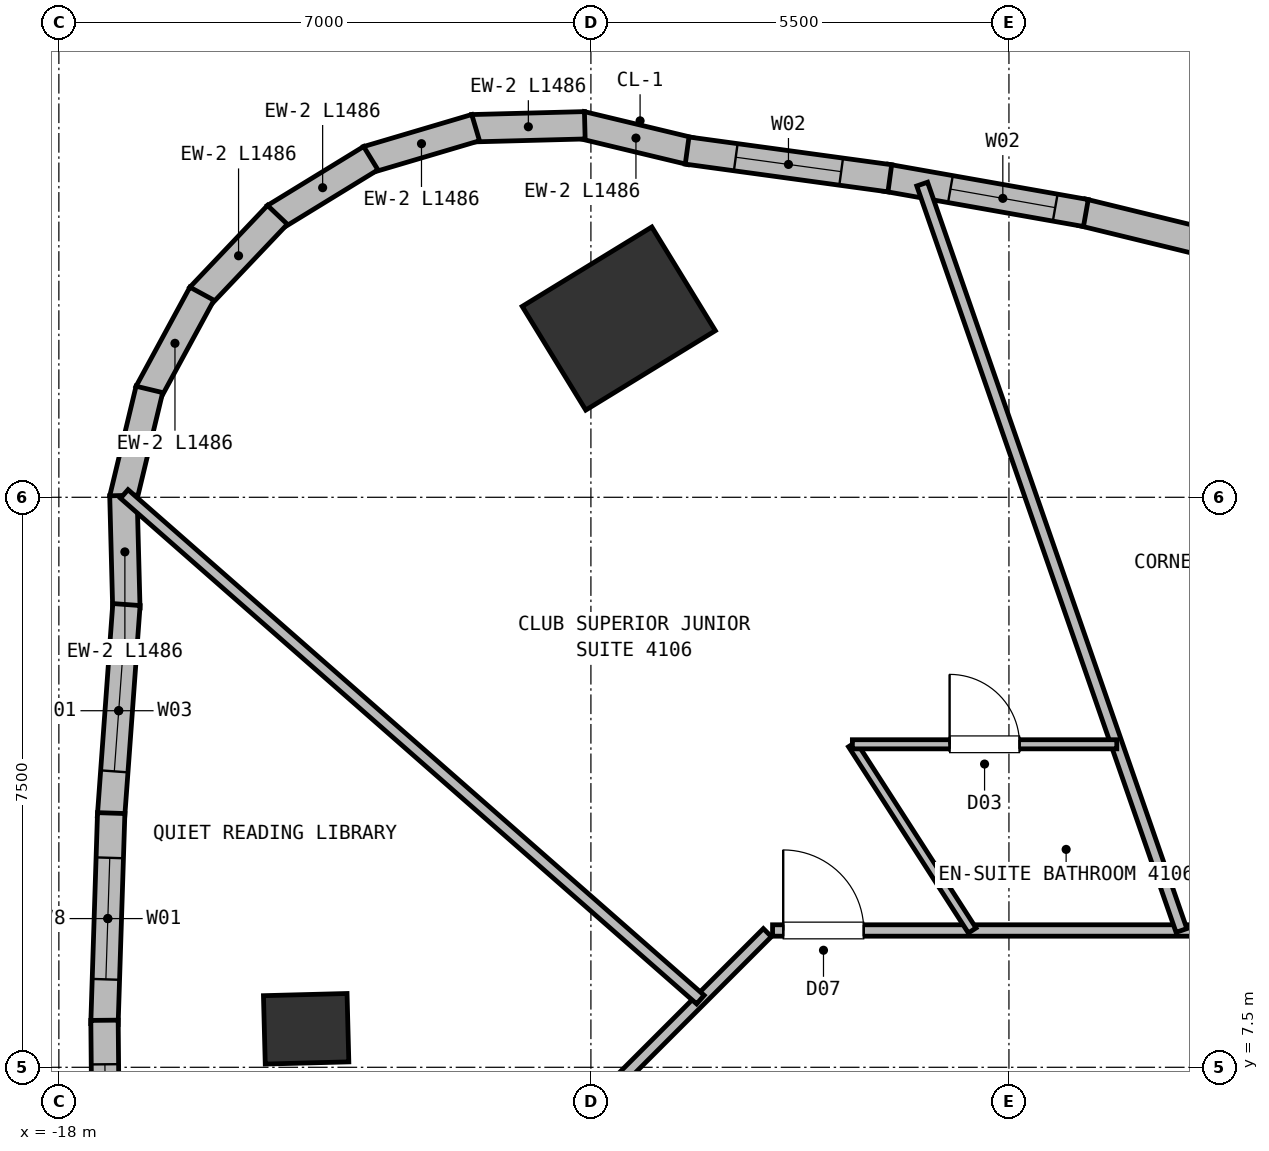
"""IFC4 building model, lengths in metres.
Left out: names, types, materials, properties, quantities, classifications, styles, units other than length and angle.
Written with IfcOpenShell. Run it as: python <this file> out.ifc"""

import sys

from ifc_helpers import new_model, si_unit, direction, frame, frame_2d, origin, origin_2d, place, context, subcontext, project, spatial, rectangle, extrude, element, fill, save


model = new_model("IFC4")
c1 = context("Model", 3, precision=1e-05, world=origin(), true_north=direction((0.0, 1.0)))
c2 = subcontext(c1, "Body", "Model", "MODEL_VIEW")
j1 = project(units=[si_unit("LENGTHUNIT", "METRE"), si_unit("PLANEANGLEUNIT", "RADIAN")], contexts=[c1])
p1 = place(None, origin())
s1 = spatial("IfcSite", under=j1, at=p1, CompositionType="ELEMENT")
p2 = place(p1, origin())
s2 = spatial("IfcBuilding", under=s1, at=p2, CompositionType="ELEMENT")
p3 = place(p2, frame((0.0, 0.0, 153.5)))
s3 = spatial("IfcBuildingStorey", under=s2, at=p3, CompositionType="ELEMENT", Elevation=153.5)
p4 = place(p3, frame((-10.633, 17.352, 0.0), z_axis=(0.0, 0.0, 1.0), x_axis=(-0.522498564716, 0.852640164354, 0.0)))
e1 = element("IfcColumn", 1, at=p4, inside=s3, PredefinedType="COLUMN", context=c2, shape_type="SweptSolid", body=[
    extrude(rectangle(XDim=1.6, YDim=2.0, at=origin_2d()), origin(), (0.0, 0.0, 1.0), 3.75),
])
p5 = place(p3, frame((-14.747, 8.007, 0.0), z_axis=(0.0, 0.0, 1.0), x_axis=(-0.026176948308, 0.999657324976, 0.0)))
e2 = element("IfcColumn", 2, at=p5, inside=s3, PredefinedType="COLUMN", context=c2, shape_type="SweptSolid", body=[
    extrude(rectangle(XDim=0.9, YDim=1.1, at=origin_2d()), origin(), (0.0, 0.0, 1.0), 3.75),
])
for number, where, z_axis, x_axis in (
    (3, (-11.13, 19.9, 0.0), (0.0, 0.0, 1.0), (0.972, -0.233, 0.0)),
    (4, (-12.566, 19.856, 0.0), (0.0, 0.0, 1.0), (1.0, 0.026, 0.0)),
    (5, (-13.941, 19.441, 0.0), (0.0, 0.0, 1.0), (0.959, 0.284, 0.0)),
):
    element("IfcWall", number, at=place(p3, frame(where, z_axis=z_axis, x_axis=x_axis)), inside=s3, PredefinedType="SOLIDWALL", context=c2, shape_type="SweptSolid", body=[
        extrude(rectangle(XDim=1.486, YDim=0.36, at=frame_2d((0.743, 0.0))), origin(), (0.0, 0.0, 1.0), 3.5),
    ])
p6 = place(p3, frame((-15.163, 18.685, 0.0), z_axis=(0.0, 0.0, 1.0), x_axis=(0.852672081239, 0.522446477522, 0.0)))
e6 = element("IfcWall", 6, at=p6, inside=s3, PredefinedType="SOLIDWALL", context=c2, shape_type="SweptSolid", body=[
    extrude(rectangle(XDim=1.486, YDim=0.36, at=frame_2d((0.743, 0.0))), origin(), (0.0, 0.0, 1.0), 3.5),
])
p7 = place(p3, frame((-16.147, 17.639, 0.0), z_axis=(0.0, 0.0, 1.0), x_axis=(0.688377955726, 0.725352183474, 0.0)))
e7 = element("IfcWall", 7, at=p7, inside=s3, PredefinedType="SOLIDWALL", context=c2, shape_type="SweptSolid", body=[
    extrude(rectangle(XDim=1.486, YDim=0.36, at=frame_2d((0.743, 0.0))), origin(), (0.0, 0.0, 1.0), 3.5),
])
for number, where, z_axis, x_axis in (
    (8, (-16.827, 16.373, 0.0), (0.0, 0.0, 1.0), (0.477, 0.879, 0.0)),
    (9, (-17.156, 14.975, 0.0), (0.0, 0.0, 1.0), (0.233, 0.972, 0.0)),
):
    element("IfcWall", number, at=place(p3, frame(where, z_axis=z_axis, x_axis=x_axis)), inside=s3, PredefinedType="SOLIDWALL", context=c2, shape_type="SweptSolid", body=[
        extrude(rectangle(XDim=1.486, YDim=0.36, at=frame_2d((0.743, 0.0))), origin(), (0.0, 0.0, 1.0), 3.5),
    ])
p8 = place(p3, frame((-17.112, 13.539, 0.0), z_axis=(0.0, 0.0, 1.0), x_axis=(-0.026129494011, 0.999658566483, 0.0)))
e10 = element("IfcWall", 10, at=p8, inside=s3, PredefinedType="SOLIDWALL", context=c2, shape_type="SweptSolid", body=[
    extrude(rectangle(XDim=1.486, YDim=0.36, at=frame_2d((0.743, 0.0))), origin(), (0.0, 0.0, 1.0), 3.5),
])
p9 = place(p3, frame((-17.314, 10.795, 0.0), z_axis=(0.0, 0.0, 1.0), x_axis=(0.072603479606, 0.99736088491, 0.0)))
e11 = element("IfcWall", 11, at=p9, inside=s3, PredefinedType="SOLIDWALL", context=c2, shape_type="SweptSolid", body=[
    extrude(rectangle(XDim=2.801, YDim=0.36, at=frame_2d((1.4, 0.0))), origin(), (0.0, 0.0, 1.0), 3.5),
])
p10 = place(p9, frame((0.601, 0.0, 0.72)))
e12 = element("IfcOpeningElement", 12, at=p10, cuts=e11, PredefinedType="OPENING", context=c2, shape_type="SweptSolid", body=[
    extrude(rectangle(XDim=1.6, YDim=1.88, at=frame_2d((0.8, 0.94))), frame((0.0, 0.19, 0.0), z_axis=(0.0, -1.0, 0.0), x_axis=(1.0, 0.0, 0.0)), (0.0, 0.0, 1.0), 0.38),
])
p11 = place(p3, frame((-17.4, 8.069, 0.0), z_axis=(0.0, 0.0, 1.0), x_axis=(0.031907059623, 0.999490840151, 0.0)))
e13 = element("IfcWall", 13, at=p11, inside=s3, PredefinedType="SOLIDWALL", context=c2, shape_type="SweptSolid", body=[
    extrude(rectangle(XDim=2.778, YDim=0.36, at=frame_2d((1.389, 0.0))), origin(), (0.0, 0.0, 1.0), 3.5),
])
p12 = place(p11, frame((0.589, 0.0, 0.72)))
e14 = element("IfcOpeningElement", 14, at=p12, cuts=e13, PredefinedType="OPENING", context=c2, shape_type="SweptSolid", body=[
    extrude(rectangle(XDim=1.6, YDim=1.88, at=frame_2d((0.8, 0.94))), frame((0.0, 0.19, 0.0), z_axis=(0.0, -1.0, 0.0), x_axis=(1.0, 0.0, 0.0)), (0.0, 0.0, 1.0), 0.38),
])
p13 = place(p3, frame((-17.374, 5.36, 0.0), z_axis=(0.0, 0.0, 1.0), x_axis=(-0.009381778629, 0.999955990146, 0.0)))
e15 = element("IfcWall", 15, at=p13, inside=s3, PredefinedType="SOLIDWALL", context=c2, shape_type="SweptSolid", body=[
    extrude(rectangle(XDim=2.758, YDim=0.36, at=frame_2d((1.379, 0.0))), origin(), (0.0, 0.0, 1.0), 3.5),
])
p14 = place(p13, frame((0.579, 0.0, 0.72)))
e16 = element("IfcOpeningElement", 16, at=p14, cuts=e15, PredefinedType="OPENING", context=c2, shape_type="SweptSolid", body=[
    extrude(rectangle(XDim=1.6, YDim=1.88, at=frame_2d((0.8, 0.94))), frame((0.0, 0.19, 0.0), z_axis=(0.0, -1.0, 0.0), x_axis=(1.0, 0.0, 0.0)), (0.0, 0.0, 1.0), 0.38),
])
p15 = place(p3, frame((-4.537, 18.75, 0.0), z_axis=(0.0, 0.0, 1.0), x_axis=(0.971526219703, -0.236932067122, 0.0)))
e17 = element("IfcWall", 17, at=p15, inside=s3, PredefinedType="SOLIDWALL", context=c2, shape_type="SweptSolid", body=[
    extrude(rectangle(XDim=5.827, YDim=0.36, at=frame_2d((2.914, 0.0))), origin(), (0.0, 0.0, 1.0), 3.5),
])
p16 = place(p15, frame((1.66, 0.0, 0.72)))
e18 = element("IfcOpeningElement", 18, at=p16, cuts=e17, PredefinedType="OPENING", context=c2, shape_type="SweptSolid", body=[
    extrude(rectangle(XDim=1.6, YDim=1.88, at=frame_2d((0.8, 0.94))), frame((0.0, 0.19, 0.0), z_axis=(0.0, -1.0, 0.0), x_axis=(1.0, 0.0, 0.0)), (0.0, 0.0, 1.0), 0.38),
])
p17 = place(p3, frame((-7.117, 19.205, 0.0), z_axis=(0.0, 0.0, 1.0), x_axis=(0.984708898385, -0.174207879961, 0.0)))
e19 = element("IfcWall", 19, at=p17, inside=s3, PredefinedType="SOLIDWALL", context=c2, shape_type="SweptSolid", body=[
    extrude(rectangle(XDim=2.67, YDim=0.36, at=frame_2d((1.335, 0.0))), origin(), (0.0, 0.0, 1.0), 3.5),
])
p18 = place(p17, frame((0.86, 0.0, 0.72)))
e20 = element("IfcOpeningElement", 20, at=p18, cuts=e19, PredefinedType="OPENING", context=c2, shape_type="SweptSolid", body=[
    extrude(rectangle(XDim=1.4, YDim=1.84, at=frame_2d((0.7, 0.92))), frame((0.0, 0.19, 0.0), z_axis=(0.0, -1.0, 0.0), x_axis=(1.0, 0.0, 0.0)), (0.0, 0.0, 1.0), 0.38),
])
p19 = place(p3, frame((-9.734, 19.562, 0.0), z_axis=(0.0, 0.0, 1.0), x_axis=(0.990763260655, -0.135602954745, 0.0)))
e21 = element("IfcWall", 21, at=p19, inside=s3, PredefinedType="SOLIDWALL", context=c2, shape_type="SweptSolid", body=[
    extrude(rectangle(XDim=2.692, YDim=0.36, at=frame_2d((1.346, 0.0))), origin(), (0.0, 0.0, 1.0), 3.5),
])
p20 = place(p19, frame((0.646, 0.0, 0.72)))
e22 = element("IfcOpeningElement", 22, at=p20, cuts=e21, PredefinedType="OPENING", context=c2, shape_type="SweptSolid", body=[
    extrude(rectangle(XDim=1.4, YDim=1.84, at=frame_2d((0.7, 0.92))), frame((0.0, 0.19, 0.0), z_axis=(0.0, -1.0, 0.0), x_axis=(1.0, 0.0, 0.0)), (0.0, 0.0, 1.0), 0.38),
])
p21 = place(p3, frame((-8.61, 9.3, 0.0), z_axis=(0.0, 0.0, 1.0), x_axis=(1.0, 0.0, 0.0)))
e23 = element("IfcWall", 23, at=p21, inside=s3, PredefinedType="PARTITIONING", context=c2, shape_type="SweptSolid", body=[
    extrude(rectangle(XDim=17.22, YDim=0.15, at=frame_2d((8.61, 0.0))), origin(), (0.0, 0.0, 1.0), 3.5),
])
p22 = place(p21, frame((12.527, 0.0, 0.0)))
e24 = element("IfcOpeningElement", 24, at=p22, cuts=e23, PredefinedType="OPENING", context=c2, shape_type="SweptSolid", body=[
    extrude(rectangle(XDim=1.0, YDim=2.15, at=frame_2d((0.5, 1.075))), frame((0.0, 0.085, 0.0), z_axis=(0.0, -1.0, 0.0), x_axis=(1.0, 0.0, 0.0)), (0.0, 0.0, 1.0), 0.17),
])
p23 = place(p21, frame((6.231, 0.0, 0.0)))
e25 = element("IfcOpeningElement", 25, at=p23, cuts=e23, PredefinedType="OPENING", context=c2, shape_type="SweptSolid", body=[
    extrude(rectangle(XDim=1.06, YDim=2.15, at=frame_2d((0.53, 1.075))), frame((0.0, 0.085, 0.0), z_axis=(0.0, -1.0, 0.0), x_axis=(1.0, 0.0, 0.0)), (0.0, 0.0, 1.0), 0.17),
])
p24 = place(p21, frame((0.14, 0.0, 0.0)))
e26 = element("IfcOpeningElement", 26, at=p24, cuts=e23, PredefinedType="OPENING", context=c2, shape_type="SweptSolid", body=[
    extrude(rectangle(XDim=1.06, YDim=2.15, at=frame_2d((0.53, 1.075))), frame((0.0, 0.085, 0.0), z_axis=(0.0, -1.0, 0.0), x_axis=(1.0, 0.0, 0.0)), (0.0, 0.0, 1.0), 0.17),
])
p25 = place(p3, frame((-10.722, 7.228, 0.0), z_axis=(0.0, 0.0, 1.0), x_axis=(0.707106781187, 0.707106781187, 0.0)))
e27 = element("IfcWall", 27, at=p25, inside=s3, PredefinedType="PARTITIONING", context=c2, shape_type="SweptSolid", body=[
    extrude(rectangle(XDim=2.89, YDim=0.15, at=frame_2d((1.445, 0.0))), origin(), (0.0, 0.0, 1.0), 3.5),
])
p26 = place(p3, frame((-3.23, 9.3, 0.0), z_axis=(0.0, 0.0, 1.0), x_axis=(-0.328129858039, 0.944632625026, 0.0)))
e28 = element("IfcWall", 28, at=p26, inside=s3, PredefinedType="PARTITIONING", context=c2, shape_type="SweptSolid", body=[
    extrude(rectangle(XDim=10.396, YDim=0.15, at=frame_2d((5.198, 0.0))), origin(), (0.0, 0.0, 1.0), 3.5),
])
p27 = place(p3, frame((-5.984, 9.3, 0.0), z_axis=(0.0, 0.0, 1.0), x_axis=(-0.541109088666, 0.840952408976, 0.0)))
e29 = element("IfcWall", 29, at=p27, inside=s3, PredefinedType="PARTITIONING", context=c2, shape_type="SweptSolid", body=[
    extrude(rectangle(XDim=2.913, YDim=0.12, at=frame_2d((1.457, 0.0))), origin(), (0.0, 0.0, 1.0), 3.5),
])
p28 = place(p3, frame((-7.56, 11.75, 0.0), z_axis=(0.0, 0.0, 1.0), x_axis=(1.0, 0.0, 0.0)))
e30 = element("IfcWall", 30, at=p28, inside=s3, PredefinedType="PARTITIONING", context=c2, shape_type="SweptSolid", body=[
    extrude(rectangle(XDim=3.479, YDim=0.12, at=frame_2d((1.739, 0.0))), origin(), (0.0, 0.0, 1.0), 3.5),
])
p29 = place(p28, frame((1.279, 0.0, 0.0)))
e31 = element("IfcOpeningElement", 31, at=p29, cuts=e30, PredefinedType="OPENING", context=c2, shape_type="SweptSolid", body=[
    extrude(rectangle(XDim=0.92, YDim=2.1, at=frame_2d((0.46, 1.05))), frame((0.0, 0.07, 0.0), z_axis=(0.0, -1.0, 0.0), x_axis=(1.0, 0.0, 0.0)), (0.0, 0.0, 1.0), 0.14),
])
p30 = place(p3, frame((-9.56, 8.39, 0.0), z_axis=(0.0, 0.0, 1.0), x_axis=(-0.751556130323, 0.659669146598, 0.0)))
e32 = element("IfcWall", 32, at=p30, inside=s3, PredefinedType="PARTITIONING", context=c2, shape_type="SweptSolid", body=[
    extrude(rectangle(XDim=10.086, YDim=0.15, at=frame_2d((5.043, 0.0))), origin(), (0.0, 0.0, 1.0), 3.5),
])
p31 = place(p10, origin())
e33 = element("IfcWindow", 33, at=p31, inside=s3, PartitioningType="SINGLE_PANEL", PredefinedType="WINDOW", context=c2, shape_type="SweptSolid", body=[
    extrude(rectangle(XDim=1.6, YDim=1.88, at=frame_2d((0.8, 0.94))), frame((0.0, 0.03, 0.0), z_axis=(0.0, -1.0, 0.0), x_axis=(1.0, 0.0, 0.0)), (0.0, 0.0, 1.0), 0.06),
])
fill(e12, e33)
p32 = place(p12, origin())
e34 = element("IfcWindow", 34, at=p32, inside=s3, PartitioningType="SINGLE_PANEL", PredefinedType="WINDOW", context=c2, shape_type="SweptSolid", body=[
    extrude(rectangle(XDim=1.6, YDim=1.88, at=frame_2d((0.8, 0.94))), frame((0.0, 0.03, 0.0), z_axis=(0.0, -1.0, 0.0), x_axis=(1.0, 0.0, 0.0)), (0.0, 0.0, 1.0), 0.06),
])
fill(e14, e34)
p33 = place(p14, origin())
e35 = element("IfcWindow", 35, at=p33, inside=s3, PartitioningType="SINGLE_PANEL", PredefinedType="WINDOW", context=c2, shape_type="SweptSolid", body=[
    extrude(rectangle(XDim=1.6, YDim=1.88, at=frame_2d((0.8, 0.94))), frame((0.0, 0.03, 0.0), z_axis=(0.0, -1.0, 0.0), x_axis=(1.0, 0.0, 0.0)), (0.0, 0.0, 1.0), 0.06),
])
fill(e16, e35)
p34 = place(p18, origin())
e36 = element("IfcWindow", 36, at=p34, inside=s3, PartitioningType="SINGLE_PANEL", PredefinedType="WINDOW", context=c2, shape_type="SweptSolid", body=[
    extrude(rectangle(XDim=1.4, YDim=1.84, at=frame_2d((0.7, 0.92))), frame((0.0, 0.03, 0.0), z_axis=(0.0, -1.0, 0.0), x_axis=(1.0, 0.0, 0.0)), (0.0, 0.0, 1.0), 0.06),
])
fill(e20, e36)
p35 = place(p20, origin())
e37 = element("IfcWindow", 37, at=p35, inside=s3, PartitioningType="SINGLE_PANEL", PredefinedType="WINDOW", context=c2, shape_type="SweptSolid", body=[
    extrude(rectangle(XDim=1.4, YDim=1.84, at=frame_2d((0.7, 0.92))), frame((0.0, 0.03, 0.0), z_axis=(0.0, -1.0, 0.0), x_axis=(1.0, 0.0, 0.0)), (0.0, 0.0, 1.0), 0.06),
])
fill(e22, e37)
p36 = place(p29, origin())
e38 = element("IfcDoor", 38, at=p36, inside=s3, OperationType="SINGLE_SWING_LEFT", PredefinedType="DOOR", context=c2, shape_type="SweptSolid", body=[
    extrude(rectangle(XDim=0.92, YDim=2.1, at=frame_2d((0.46, 1.05))), frame((0.0, 0.025, 0.0), z_axis=(0.0, -1.0, 0.0), x_axis=(1.0, 0.0, 0.0)), (0.0, 0.0, 1.0), 0.05),
])
fill(e31, e38)
p37 = place(p24, origin())
e39 = element("IfcDoor", 39, at=p37, inside=s3, OperationType="SINGLE_SWING_LEFT", PredefinedType="DOOR", context=c2, shape_type="SweptSolid", body=[
    extrude(rectangle(XDim=1.06, YDim=2.15, at=frame_2d((0.53, 1.075))), frame((0.0, 0.025, 0.0), z_axis=(0.0, -1.0, 0.0), x_axis=(1.0, 0.0, 0.0)), (0.0, 0.0, 1.0), 0.05),
])
fill(e26, e39)
save(model, sys.argv[1])
